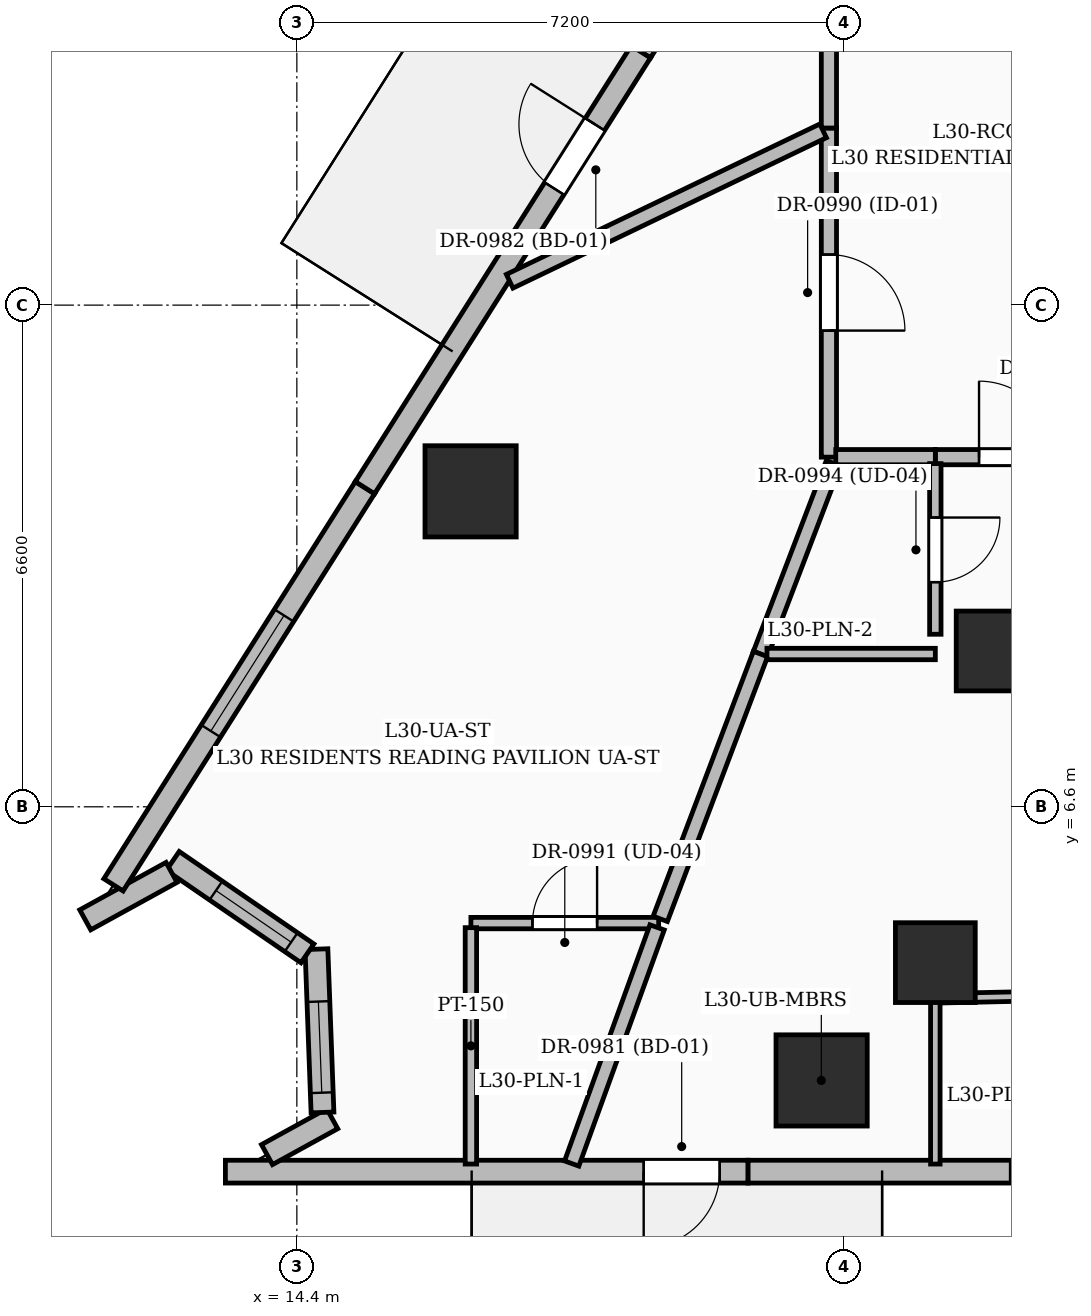
"""IFC4 building model, lengths in metres.
Left out: names, types, materials, properties, quantities, classifications, styles, units other than length and angle.
Written with IfcOpenShell. Run it as: python <this file> out.ifc"""

import sys

from ifc_helpers import new_model, si_unit, direction, frame, frame_2d, origin, origin_2d, place, context, subcontext, project, spatial, rectangle, extrude, element, fill, save


model = new_model("IFC4")
c1 = context("Model", 3, precision=1e-05, world=origin(), true_north=direction((0.0, 1.0)))
c2 = subcontext(c1, "Body", "Model", "MODEL_VIEW")
j1 = project(units=[si_unit("LENGTHUNIT", "METRE"), si_unit("PLANEANGLEUNIT", "RADIAN")], contexts=[c1])
p1 = place(None, origin())
s1 = spatial("IfcSite", under=j1, at=p1, CompositionType="ELEMENT")
p2 = place(p1, origin())
s2 = spatial("IfcBuilding", under=s1, at=p2, CompositionType="ELEMENT")
p3 = place(p2, frame((0.0, 0.0, 121.2)))
s3 = spatial("IfcBuildingStorey", under=s2, at=p3, CompositionType="ELEMENT", Elevation=121.2)
for number, where, z_axis, x_axis in (
    (1, (22.8, 4.55, 0.0), (0.0, 0.0, 1.0), (1.0, 0.0, 0.0)),
    (2, (23.6, 8.65, 0.0), (0.0, 0.0, 1.0), (1.0, 0.0, 0.0)),
):
    element("IfcColumn", number, at=place(p3, frame(where, z_axis=z_axis, x_axis=x_axis)), inside=s3, PredefinedType="COLUMN", context=c2, shape_type="SweptSolid", body=[
        extrude(rectangle(XDim=1.05, YDim=1.05, at=origin_2d()), origin(), (0.0, 0.0, 1.0), 3.6),
    ])
for number, where, z_axis, x_axis in (
    (3, (21.304, 3.0, 0.0), (0.0, 0.0, 1.0), (1.0, 0.0, 0.0)),
    (4, (16.686, 10.75, 0.0), (0.0, 0.0, 1.0), (1.0, 0.0, 0.0)),
):
    element("IfcColumn", number, at=place(p3, frame(where, z_axis=z_axis, x_axis=x_axis)), inside=s3, PredefinedType="COLUMN", context=c2, shape_type="SweptSolid", body=[
        extrude(rectangle(XDim=1.2, YDim=1.2, at=origin_2d()), origin(), (0.0, 0.0, 1.0), 3.6),
    ])
p4 = place(p3, frame((26.933, 1.8, 0.0), z_axis=(0.0, 0.0, 1.0), x_axis=(-1.0, 0.0, 0.0)))
e5 = element("IfcWall", 5, at=p4, inside=s3, PredefinedType="SOLIDWALL", context=c2, shape_type="SweptSolid", body=[
    extrude(rectangle(XDim=6.599, YDim=0.3, at=frame_2d((3.3, 0.0))), origin(), (0.0, 0.0, 1.0), 3.35),
])
p5 = place(p4, frame((1.35, 0.0, 0.6)))
e6 = element("IfcOpeningElement", 6, at=p5, cuts=e5, PredefinedType="OPENING", context=c2, shape_type="SweptSolid", body=[
    extrude(rectangle(XDim=1.8, YDim=2.1, at=frame_2d((0.9, 1.05))), frame((0.0, 0.16, 0.0), z_axis=(0.0, -1.0, 0.0), x_axis=(1.0, 0.0, 0.0)), (0.0, 0.0, 1.0), 0.32),
])
p6 = place(p3, frame((20.334, 1.8, 0.0), z_axis=(0.0, 0.0, 1.0), x_axis=(-1.0, 0.0, 0.0)))
e7 = element("IfcWall", 7, at=p6, inside=s3, PredefinedType="SOLIDWALL", context=c2, shape_type="SweptSolid", body=[
    extrude(rectangle(XDim=6.874, YDim=0.3, at=frame_2d((3.437, 0.0))), origin(), (0.0, 0.0, 1.0), 3.35),
])
p7 = place(p6, frame((0.371, 0.0, 0.0)))
e8 = element("IfcOpeningElement", 8, at=p7, cuts=e7, PredefinedType="OPENING", context=c2, shape_type="SweptSolid", body=[
    extrude(rectangle(XDim=1.0, YDim=2.2, at=frame_2d((0.5, 1.1))), frame((0.0, 0.16, 0.0), z_axis=(0.0, -1.0, 0.0), x_axis=(1.0, 0.0, 0.0)), (0.0, 0.0, 1.0), 0.32),
])
p8 = place(p3, frame((14.007, 2.024, 0.0), z_axis=(0.0, 0.0, 1.0), x_axis=(0.876089618579, 0.482148296914, 0.0)))
e9 = element("IfcWall", 9, at=p8, inside=s3, PredefinedType="SOLIDWALL", context=c2, shape_type="SweptSolid", body=[
    extrude(rectangle(XDim=0.98, YDim=0.3, at=frame_2d((0.49, 0.0))), origin(), (0.0, 0.0, 1.0), 3.35),
])
p9 = place(p3, frame((14.738, 2.579, 0.0), z_axis=(0.0, 0.0, 1.0), x_axis=(-0.037141892545, 0.99931000186, 0.0)))
e10 = element("IfcWall", 10, at=p9, inside=s3, PredefinedType="SOLIDWALL", context=c2, shape_type="SweptSolid", body=[
    extrude(rectangle(XDim=2.149, YDim=0.3, at=frame_2d((1.075, 0.0))), origin(), (0.0, 0.0, 1.0), 3.35),
])
p10 = place(p9, frame((0.26, 0.0, 0.8)))
e11 = element("IfcOpeningElement", 11, at=p10, cuts=e10, PredefinedType="OPENING", context=c2, shape_type="SweptSolid", body=[
    extrude(rectangle(XDim=1.2, YDim=1.8, at=frame_2d((0.6, 0.9))), frame((0.0, 0.16, 0.0), z_axis=(0.0, -1.0, 0.0), x_axis=(1.0, 0.0, 0.0)), (0.0, 0.0, 1.0), 0.32),
])
p11 = place(p3, frame((14.539, 4.672, 0.0), z_axis=(0.0, 0.0, 1.0), x_axis=(-0.824422928204, 0.565974235678, 0.0)))
e12 = element("IfcWall", 12, at=p11, inside=s3, PredefinedType="SOLIDWALL", context=c2, shape_type="SweptSolid", body=[
    extrude(rectangle(XDim=2.149, YDim=0.3, at=frame_2d((1.075, 0.0))), origin(), (0.0, 0.0, 1.0), 3.35),
])
p12 = place(p11, frame((0.26, 0.0, 0.8)))
e13 = element("IfcOpeningElement", 13, at=p12, cuts=e12, PredefinedType="OPENING", context=c2, shape_type="SweptSolid", body=[
    extrude(rectangle(XDim=1.2, YDim=1.8, at=frame_2d((0.6, 0.9))), frame((0.0, 0.16, 0.0), z_axis=(0.0, -1.0, 0.0), x_axis=(1.0, 0.0, 0.0)), (0.0, 0.0, 1.0), 0.32),
])
p13 = place(p3, frame((12.752, 5.737, 0.0), z_axis=(0.0, 0.0, 1.0), x_axis=(-0.876299432815, -0.481766856527, 0.0)))
e14 = element("IfcWall", 14, at=p13, inside=s3, PredefinedType="SOLIDWALL", context=c2, shape_type="SweptSolid", body=[
    extrude(rectangle(XDim=1.296, YDim=0.3, at=frame_2d((0.648, 0.0))), origin(), (0.0, 0.0, 1.0), 3.35),
])
p14 = place(p3, frame((11.988, 5.573, 0.0), z_axis=(0.0, 0.0, 1.0), x_axis=(0.534894283056, 0.844918993723, 0.0)))
e15 = element("IfcWall", 15, at=p14, inside=s3, PredefinedType="SOLIDWALL", context=c2, shape_type="SweptSolid", body=[
    extrude(rectangle(XDim=6.184, YDim=0.3, at=frame_2d((3.092, 0.0))), origin(), (0.0, 0.0, 1.0), 3.35),
])
p15 = place(p14, frame((2.395, 0.0, 0.6)))
e16 = element("IfcOpeningElement", 16, at=p15, cuts=e15, PredefinedType="OPENING", context=c2, shape_type="SweptSolid", body=[
    extrude(rectangle(XDim=1.8, YDim=2.1, at=frame_2d((0.9, 1.05))), frame((0.0, 0.16, 0.0), z_axis=(0.0, -1.0, 0.0), x_axis=(1.0, 0.0, 0.0)), (0.0, 0.0, 1.0), 0.32),
])
p16 = place(p3, frame((15.296, 10.798, 0.0), z_axis=(0.0, 0.0, 1.0), x_axis=(0.534877542647, 0.84492959137, 0.0)))
e17 = element("IfcWall", 17, at=p16, inside=s3, PredefinedType="SOLIDWALL", context=c2, shape_type="SweptSolid", body=[
    extrude(rectangle(XDim=6.789, YDim=0.3, at=frame_2d((3.395, 0.0))), origin(), (0.0, 0.0, 1.0), 3.35),
])
p17 = place(p16, frame((4.658, 0.0, 0.0)))
e18 = element("IfcOpeningElement", 18, at=p17, cuts=e17, PredefinedType="OPENING", context=c2, shape_type="SweptSolid", body=[
    extrude(rectangle(XDim=1.0, YDim=2.2, at=frame_2d((0.5, 1.1))), frame((0.0, 0.16, 0.0), z_axis=(0.0, -1.0, 0.0), x_axis=(1.0, 0.0, 0.0)), (0.0, 0.0, 1.0), 0.32),
])
p18 = place(p3, frame((18.927, 16.534, 0.0), z_axis=(0.0, 0.0, 1.0), x_axis=(0.534886962815, 0.844923627916, 0.0)))
e19 = element("IfcWall", 19, at=p18, inside=s3, PredefinedType="SOLIDWALL", context=c2, shape_type="SweptSolid", body=[
    extrude(rectangle(XDim=6.79, YDim=0.3, at=frame_2d((3.395, 0.0))), origin(), (0.0, 0.0, 1.0), 3.35),
])
p19 = place(p18, frame((2.525, 0.0, 0.6)))
e20 = element("IfcOpeningElement", 20, at=p19, cuts=e19, PredefinedType="OPENING", context=c2, shape_type="SweptSolid", body=[
    extrude(rectangle(XDim=1.5, YDim=2.1, at=frame_2d((0.75, 1.05))), frame((0.0, 0.16, 0.0), z_axis=(0.0, -1.0, 0.0), x_axis=(1.0, 0.0, 0.0)), (0.0, 0.0, 1.0), 0.32),
])
p20 = place(p3, frame((21.4, 15.53, 0.0), z_axis=(0.0, 0.0, 1.0), x_axis=(0.0, -1.0, 0.0)))
e21 = element("IfcWall", 21, at=p20, inside=s3, PredefinedType="PARTITIONING", context=c2, shape_type="SweptSolid", body=[
    extrude(rectangle(XDim=4.33, YDim=0.2, at=frame_2d((2.165, 0.0))), origin(), (0.0, 0.0, 1.0), 2.787),
])
p21 = place(p20, frame((1.665, 0.0, 0.0)))
e22 = element("IfcOpeningElement", 22, at=p21, cuts=e21, PredefinedType="OPENING", context=c2, shape_type="SweptSolid", body=[
    extrude(rectangle(XDim=1.0, YDim=2.2, at=frame_2d((0.5, 1.1))), frame((0.0, 0.11, 0.0), z_axis=(0.0, -1.0, 0.0), x_axis=(1.0, 0.0, 0.0)), (0.0, 0.0, 1.0), 0.22),
])
p22 = place(p3, frame((22.8, 11.2, 0.0), z_axis=(0.0, 0.0, 1.0), x_axis=(1.0, 0.0, 0.0)))
e23 = element("IfcWall", 23, at=p22, inside=s3, PredefinedType="PARTITIONING", context=c2, shape_type="SweptSolid", body=[
    extrude(rectangle(XDim=2.069, YDim=0.2, at=frame_2d((1.035, 0.0))), origin(), (0.0, 0.0, 1.0), 3.35),
])
p23 = place(p22, frame((0.575, 0.0, 0.0)))
e24 = element("IfcOpeningElement", 24, at=p23, cuts=e23, PredefinedType="OPENING", context=c2, shape_type="SweptSolid", body=[
    extrude(rectangle(XDim=1.0, YDim=2.2, at=frame_2d((0.5, 1.1))), frame((0.0, 0.11, 0.0), z_axis=(0.0, -1.0, 0.0), x_axis=(1.0, 0.0, 0.0)), (0.0, 0.0, 1.0), 0.22),
])
p24 = place(p3, frame((21.49, 11.2, 0.0), z_axis=(0.0, 0.0, 1.0), x_axis=(1.0, 0.0, 0.0)))
e25 = element("IfcWall", 25, at=p24, inside=s3, PredefinedType="PARTITIONING", context=c2, shape_type="SweptSolid", body=[
    extrude(rectangle(XDim=1.31, YDim=0.2, at=frame_2d((0.655, 0.0))), origin(), (0.0, 0.0, 1.0), 3.35),
])
p25 = place(p3, frame((21.4, 17.665, 0.0), z_axis=(0.0, 0.0, 1.0), x_axis=(0.0, -1.0, 0.0)))
e26 = element("IfcWall", 26, at=p25, inside=s3, PredefinedType="PARTITIONING", context=c2, shape_type="SweptSolid", body=[
    extrude(rectangle(XDim=2.135, YDim=0.2, at=frame_2d((1.067, 0.0))), origin(), (0.0, 0.0, 1.0), 2.57),
])
p26 = place(p3, frame((16.69, 5.07, 0.0), z_axis=(0.0, 0.0, 1.0), x_axis=(1.0, 0.0, 0.0)))
e27 = element("IfcWall", 27, at=p26, inside=s3, PredefinedType="PARTITIONING", context=c2, shape_type="SweptSolid", body=[
    extrude(rectangle(XDim=2.47, YDim=0.15, at=frame_2d((1.235, 0.0))), origin(), (0.0, 0.0, 1.0), 3.35),
])
p27 = place(p26, frame((0.81, 0.0, 0.0)))
e28 = element("IfcOpeningElement", 28, at=p27, cuts=e27, PredefinedType="OPENING", context=c2, shape_type="SweptSolid", body=[
    extrude(rectangle(XDim=0.85, YDim=2.1, at=frame_2d((0.425, 1.05))), frame((0.0, 0.085, 0.0), z_axis=(0.0, -1.0, 0.0), x_axis=(1.0, 0.0, 0.0)), (0.0, 0.0, 1.0), 0.17),
])
p28 = place(p3, frame((20.5, 8.61, 0.0), z_axis=(0.0, 0.0, 1.0), x_axis=(0.357079192951, 0.934074113741, 0.0)))
e29 = element("IfcWall", 29, at=p28, inside=s3, PredefinedType="PARTITIONING", context=c2, shape_type="SweptSolid", body=[
    extrude(rectangle(XDim=2.688, YDim=0.2, at=frame_2d((1.344, 0.0))), origin(), (0.0, 0.0, 1.0), 2.372),
])
p29 = place(p3, frame((19.181, 5.126, 0.0), z_axis=(0.0, 0.0, 1.0), x_axis=(0.354037743034, 0.935231135339, 0.0)))
e30 = element("IfcWall", 30, at=p29, inside=s3, PredefinedType="PARTITIONING", context=c2, shape_type="SweptSolid", body=[
    extrude(rectangle(XDim=3.725, YDim=0.2, at=frame_2d((1.863, 0.0))), origin(), (0.0, 0.0, 1.0), 2.57),
])
p30 = place(p3, frame((21.324, 15.493, 0.0), z_axis=(0.0, 0.0, 1.0), x_axis=(-0.901578855608, -0.432614802244, 0.0)))
e31 = element("IfcWall", 31, at=p30, inside=s3, PredefinedType="PARTITIONING", context=c2, shape_type="SweptSolid", body=[
    extrude(rectangle(XDim=4.574, YDim=0.2, at=frame_2d((2.287, 0.0))), origin(), (0.0, 0.0, 1.0), 2.57),
])
p31 = place(p3, frame((16.69, 1.9, 0.0), z_axis=(0.0, 0.0, 1.0), x_axis=(0.0, 1.0, 0.0)))
e32 = element("IfcWall", 32, at=p31, inside=s3, PredefinedType="PARTITIONING", context=c2, shape_type="SweptSolid", body=[
    extrude(rectangle(XDim=3.11, YDim=0.15, at=frame_2d((1.555, 0.0))), origin(), (0.0, 0.0, 1.0), 3.35),
])
p32 = place(p3, frame((18.016, 1.907, 0.0), z_axis=(0.0, 0.0, 1.0), x_axis=(0.340027621293, 0.940415449021, 0.0)))
e33 = element("IfcWall", 33, at=p32, inside=s3, PredefinedType="PARTITIONING", context=c2, shape_type="SweptSolid", body=[
    extrude(rectangle(XDim=3.303, YDim=0.2, at=frame_2d((1.652, 0.0))), origin(), (0.0, 0.0, 1.0), 3.35),
])
p33 = place(p3, frame((22.8, 11.115, 0.0), z_axis=(0.0, 0.0, 1.0), x_axis=(0.0, -1.0, 0.0)))
e34 = element("IfcWall", 34, at=p33, inside=s3, PredefinedType="PARTITIONING", context=c2, shape_type="SweptSolid", body=[
    extrude(rectangle(XDim=2.245, YDim=0.15, at=frame_2d((1.123, 0.0))), origin(), (0.0, 0.0, 1.0), 2.372),
])
p34 = place(p33, frame((0.709, 0.0, 0.0)))
e35 = element("IfcOpeningElement", 35, at=p34, cuts=e34, PredefinedType="OPENING", context=c2, shape_type="SweptSolid", body=[
    extrude(rectangle(XDim=0.85, YDim=2.1, at=frame_2d((0.425, 1.05))), frame((0.0, 0.085, 0.0), z_axis=(0.0, -1.0, 0.0), x_axis=(1.0, 0.0, 0.0)), (0.0, 0.0, 1.0), 0.17),
])
p35 = place(p3, frame((22.8, 4.08, 0.0), z_axis=(0.0, 0.0, 1.0), x_axis=(0.999764473519, 0.021702476574, 0.0)))
e36 = element("IfcWall", 36, at=p35, inside=s3, PredefinedType="PARTITIONING", context=c2, shape_type="SweptSolid", body=[
    extrude(rectangle(XDim=4.376, YDim=0.125, at=frame_2d((2.188, 0.0))), origin(), (0.0, 0.0, 1.0), 3.35),
])
p36 = place(p35, frame((1.771, 0.0, 0.0)))
e37 = element("IfcOpeningElement", 37, at=p36, cuts=e36, PredefinedType="OPENING", context=c2, shape_type="SweptSolid", body=[
    extrude(rectangle(XDim=0.95, YDim=2.2, at=frame_2d((0.475, 1.1))), frame((0.0, 0.072, 0.0), z_axis=(0.0, -1.0, 0.0), x_axis=(1.0, 0.0, 0.0)), (0.0, 0.0, 1.0), 0.145),
])
p37 = place(p3, frame((20.585, 8.61, 0.0), z_axis=(0.0, 0.0, 1.0), x_axis=(1.0, 0.0, 0.0)))
e38 = element("IfcWall", 38, at=p37, inside=s3, PredefinedType="PARTITIONING", context=c2, shape_type="SweptSolid", body=[
    extrude(rectangle(XDim=2.215, YDim=0.15, at=frame_2d((1.107, 0.0))), origin(), (0.0, 0.0, 1.0), 3.35),
])
p38 = place(p3, frame((22.8, 4.15, 0.0), z_axis=(0.0, 0.0, 1.0), x_axis=(0.0, -1.0, 0.0)))
e39 = element("IfcWall", 39, at=p38, inside=s3, PredefinedType="PARTITIONING", context=c2, shape_type="SweptSolid", body=[
    extrude(rectangle(XDim=2.25, YDim=0.125, at=frame_2d((1.125, 0.0))), origin(), (0.0, 0.0, 1.0), 2.57),
])
p39 = place(p5, origin())
e40 = element("IfcWindow", 40, at=p39, inside=s3, PartitioningType="SINGLE_PANEL", PredefinedType="WINDOW", context=c2, shape_type="SweptSolid", body=[
    extrude(rectangle(XDim=1.8, YDim=2.1, at=frame_2d((0.9, 1.05))), frame((0.0, 0.03, 0.0), z_axis=(0.0, -1.0, 0.0), x_axis=(1.0, 0.0, 0.0)), (0.0, 0.0, 1.0), 0.06),
])
fill(e6, e40)
p40 = place(p7, origin())
e41 = element("IfcDoor", 41, at=p40, inside=s3, OperationType="SINGLE_SWING_RIGHT", PredefinedType="DOOR", context=c2, shape_type="SweptSolid", body=[
    extrude(rectangle(XDim=1.0, YDim=2.2, at=frame_2d((0.5, 1.1))), frame((0.0, 0.025, 0.0), z_axis=(0.0, -1.0, 0.0), x_axis=(1.0, 0.0, 0.0)), (0.0, 0.0, 1.0), 0.05),
])
fill(e8, e41)
p41 = place(p10, origin())
e42 = element("IfcWindow", 42, at=p41, inside=s3, PartitioningType="SINGLE_PANEL", PredefinedType="WINDOW", context=c2, shape_type="SweptSolid", body=[
    extrude(rectangle(XDim=1.2, YDim=1.8, at=frame_2d((0.6, 0.9))), frame((0.0, 0.03, 0.0), z_axis=(0.0, -1.0, 0.0), x_axis=(1.0, 0.0, 0.0)), (0.0, 0.0, 1.0), 0.06),
])
fill(e11, e42)
p42 = place(p12, origin())
e43 = element("IfcWindow", 43, at=p42, inside=s3, PartitioningType="SINGLE_PANEL", PredefinedType="WINDOW", context=c2, shape_type="SweptSolid", body=[
    extrude(rectangle(XDim=1.2, YDim=1.8, at=frame_2d((0.6, 0.9))), frame((0.0, 0.03, 0.0), z_axis=(0.0, -1.0, 0.0), x_axis=(1.0, 0.0, 0.0)), (0.0, 0.0, 1.0), 0.06),
])
fill(e13, e43)
p43 = place(p15, origin())
e44 = element("IfcWindow", 44, at=p43, inside=s3, PartitioningType="SINGLE_PANEL", PredefinedType="WINDOW", context=c2, shape_type="SweptSolid", body=[
    extrude(rectangle(XDim=1.8, YDim=2.1, at=frame_2d((0.9, 1.05))), frame((0.0, 0.03, 0.0), z_axis=(0.0, -1.0, 0.0), x_axis=(1.0, 0.0, 0.0)), (0.0, 0.0, 1.0), 0.06),
])
fill(e16, e44)
p44 = place(p17, origin())
e45 = element("IfcDoor", 45, at=p44, inside=s3, OperationType="SINGLE_SWING_RIGHT", PredefinedType="DOOR", context=c2, shape_type="SweptSolid", body=[
    extrude(rectangle(XDim=1.0, YDim=2.2, at=frame_2d((0.5, 1.1))), frame((0.0, 0.025, 0.0), z_axis=(0.0, -1.0, 0.0), x_axis=(1.0, 0.0, 0.0)), (0.0, 0.0, 1.0), 0.05),
])
fill(e18, e45)
p45 = place(p21, origin())
e46 = element("IfcDoor", 46, at=p45, inside=s3, OperationType="SINGLE_SWING_RIGHT", PredefinedType="DOOR", context=c2, shape_type="SweptSolid", body=[
    extrude(rectangle(XDim=1.0, YDim=2.2, at=frame_2d((0.5, 1.1))), frame((0.0, 0.025, 0.0), z_axis=(0.0, -1.0, 0.0), x_axis=(1.0, 0.0, 0.0)), (0.0, 0.0, 1.0), 0.05),
])
fill(e22, e46)
p46 = place(p27, origin())
e47 = element("IfcDoor", 47, at=p46, inside=s3, OperationType="SINGLE_SWING_RIGHT", PredefinedType="DOOR", context=c2, shape_type="SweptSolid", body=[
    extrude(rectangle(XDim=0.85, YDim=2.1, at=frame_2d((0.425, 1.05))), frame((0.0, 0.025, 0.0), z_axis=(0.0, -1.0, 0.0), x_axis=(1.0, 0.0, 0.0)), (0.0, 0.0, 1.0), 0.05),
])
fill(e28, e47)
p47 = place(p23, origin())
e48 = element("IfcDoor", 48, at=p47, inside=s3, OperationType="SINGLE_SWING_LEFT", PredefinedType="DOOR", context=c2, shape_type="SweptSolid", body=[
    extrude(rectangle(XDim=1.0, YDim=2.2, at=frame_2d((0.5, 1.1))), frame((0.0, 0.025, 0.0), z_axis=(0.0, -1.0, 0.0), x_axis=(1.0, 0.0, 0.0)), (0.0, 0.0, 1.0), 0.05),
])
fill(e24, e48)
p48 = place(p34, origin())
e49 = element("IfcDoor", 49, at=p48, inside=s3, OperationType="SINGLE_SWING_LEFT", PredefinedType="DOOR", context=c2, shape_type="SweptSolid", body=[
    extrude(rectangle(XDim=0.85, YDim=2.1, at=frame_2d((0.425, 1.05))), frame((0.0, 0.025, 0.0), z_axis=(0.0, -1.0, 0.0), x_axis=(1.0, 0.0, 0.0)), (0.0, 0.0, 1.0), 0.05),
])
fill(e35, e49)
save(model, sys.argv[1])
